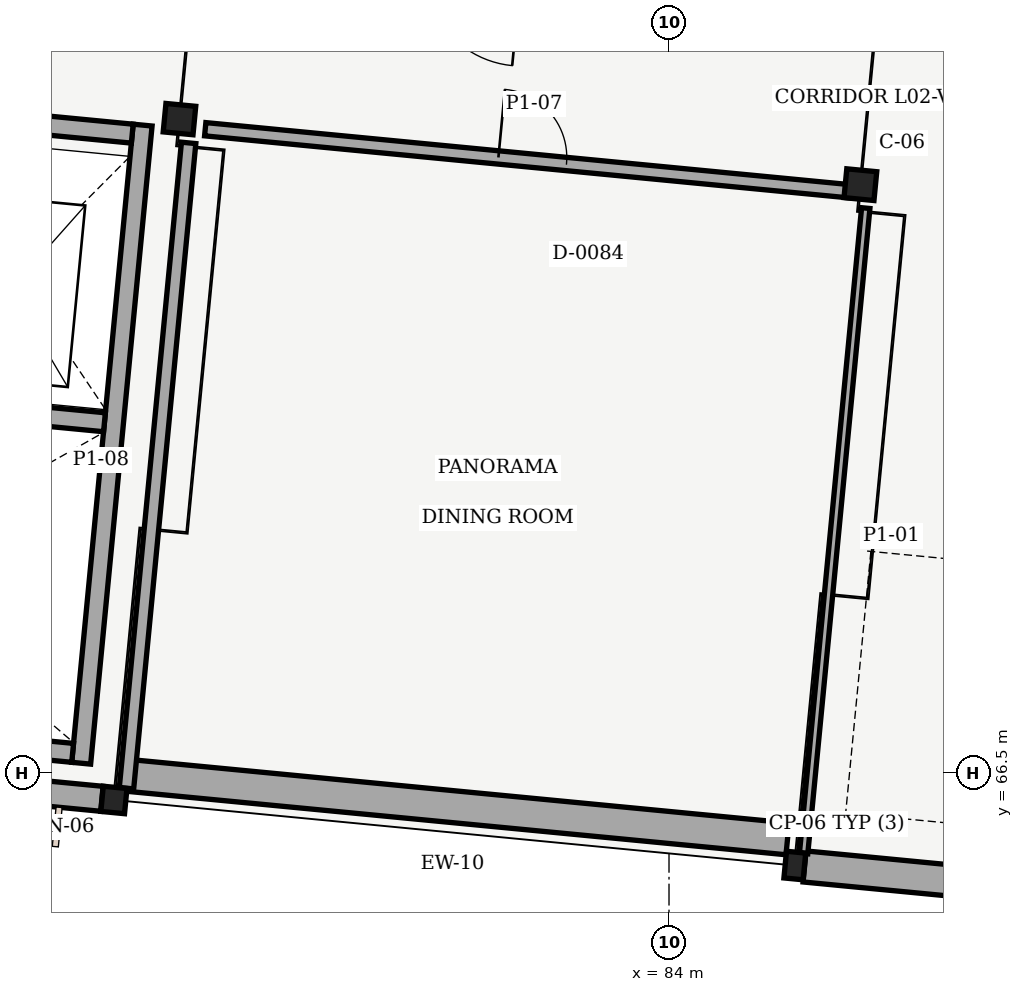
"""IFC4 building model, lengths in metres.
Left out: names, types, materials, properties, quantities, classifications, styles, units other than length and angle.
Written with IfcOpenShell. Run it as: python <this file> out.ifc"""

import sys

from ifc_helpers import new_model, si_unit, direction, frame, frame_2d, origin, origin_with_axes, origin_2d, place, context, subcontext, project, spatial, rectangle, i_section, extrude, element, fill, save


model = new_model("IFC4")
c1 = context("Model", 3, precision=1e-05, world=origin(), true_north=direction((0.0, 1.0)))
c2 = subcontext(c1, "Body", "Model", "MODEL_VIEW")
j1 = project(units=[si_unit("LENGTHUNIT", "METRE"), si_unit("PLANEANGLEUNIT", "RADIAN")], contexts=[c1])
p1 = place(None, origin())
s1 = spatial("IfcSite", under=j1, at=p1, CompositionType="ELEMENT")
p2 = place(p1, origin())
s2 = spatial("IfcBuilding", under=s1, at=p2, CompositionType="ELEMENT")
p3 = place(p2, frame((0.0, 0.0, 9.6)))
s3 = spatial("IfcBuildingStorey", under=s2, at=p3, CompositionType="ELEMENT", Elevation=9.6)
p4 = place(p3, frame((76.697, 66.141, 0.0), z_axis=(0.0, 0.0, 1.0), x_axis=(0.995396198367, -0.09584575252, 0.0)))
e1 = element("IfcColumn", 1, at=p4, inside=s3, PredefinedType="COLUMN", context=c2, shape_type="SweptSolid", body=[
    extrude(i_section(OverallWidth=0.313, OverallDepth=0.333, WebThickness=0.018, FlangeThickness=0.028, FilletRadius=0.013, at=origin_2d()), origin(), (0.0, 0.0, 1.0), 4.8),
])
p5 = place(p3, frame((77.559, 75.1, 0.0), z_axis=(0.0, 0.0, 1.0), x_axis=(0.995396198367, -0.09584575252, 0.0)))
e2 = element("IfcColumn", 2, at=p5, inside=s3, PredefinedType="COLUMN", context=c2, shape_type="SweptSolid", body=[
    extrude(i_section(OverallWidth=0.394, OverallDepth=0.376, WebThickness=0.017, FlangeThickness=0.028, FilletRadius=0.015, at=origin_2d()), origin(), (0.0, 0.0, 1.0), 4.8),
])
p6 = place(p3, frame((85.655, 65.279, 0.0), z_axis=(0.0, 0.0, 1.0), x_axis=(0.995396198367, -0.09584575252, 0.0)))
e3 = element("IfcColumn", 3, at=p6, inside=s3, PredefinedType="PILASTER", context=c2, shape_type="SweptSolid", body=[
    extrude(i_section(OverallWidth=0.254, OverallDepth=0.353, WebThickness=0.01, FlangeThickness=0.016, FilletRadius=0.012, at=origin_2d()), origin(), (0.0, 0.0, 1.0), 4.8),
])
p7 = place(p3, frame((86.518, 74.237, 0.0), z_axis=(0.0, 0.0, 1.0), x_axis=(0.995396198367, -0.09584575252, 0.0)))
e4 = element("IfcColumn", 4, at=p7, inside=s3, PredefinedType="COLUMN", context=c2, shape_type="SweptSolid", body=[
    extrude(i_section(OverallWidth=0.396, OverallDepth=0.381, WebThickness=0.019, FlangeThickness=0.03, FilletRadius=0.015, at=origin_2d()), origin(), (0.0, 0.0, 1.0), 4.8),
])
p8 = place(p3, frame((94.456, 64.431, 0.0), z_axis=(0.0, 0.0, 1.0), x_axis=(-0.99539453955, 0.09586297843, 0.0)))
e5 = element("IfcWall", 5, at=p8, inside=s3, PredefinedType="SOLIDWALL", context=c2, shape_type="SweptSolid", body=[
    extrude(rectangle(XDim=8.712, YDim=0.41, at=frame_2d((4.356, 0.0))), origin(), (0.0, 0.0, 1.0), 3.4),
])
p9 = place(p3, frame((85.559, 65.629, 0.0), z_axis=(0.0, 0.0, 1.0), x_axis=(-0.99539453955, 0.09586297843, 0.0)))
e6 = element("IfcWall", 6, at=p9, inside=s3, PredefinedType="SOLIDWALL", context=c2, shape_type="SweptSolid", body=[
    extrude(rectangle(XDim=8.712, YDim=0.42, at=frame_2d((4.356, 0.0))), origin(), (0.0, 0.0, 1.0), 3.4),
])
p10 = place(p3, frame((76.539, 66.156, 0.0), z_axis=(0.0, 0.0, 1.0), x_axis=(-0.995397794476, 0.095829174848, 0.0)))
e7 = element("IfcWall", 7, at=p10, inside=s3, PredefinedType="SOLIDWALL", context=c2, shape_type="SweptSolid", body=[
    extrude(rectangle(XDim=8.685, YDim=0.33, at=frame_2d((4.343, 0.0))), origin(), (0.0, 0.0, 1.0), 3.4),
])
p11 = place(p3, frame((76.266, 66.625, 0.0), z_axis=(0.0, 0.0, 1.0), x_axis=(0.095832083117, 0.995397514486, 0.0)))
e8 = element("IfcWall", 8, at=p11, inside=s3, PredefinedType="SHEAR", context=c2, shape_type="SweptSolid", body=[
    extrude(rectangle(XDim=8.435, YDim=0.25, at=frame_2d((4.218, 0.0))), origin(), (0.0, 0.0, 1.0), 4.54),
])
p12 = place(p3, frame((68.638, 67.485, 0.0), z_axis=(0.0, 0.0, 1.0), x_axis=(0.995396104215, -0.095846730326, 0.0)))
e9 = element("IfcWall", 9, at=p12, inside=s3, PredefinedType="SHEAR", context=c2, shape_type="SweptSolid", body=[
    extrude(rectangle(XDim=7.55, YDim=0.25, at=frame_2d((3.775, 0.0))), origin(), (0.0, 0.0, 1.0), 4.54),
])
p13 = place(p3, frame((76.573, 71.111, 0.0), z_axis=(0.0, 0.0, 1.0), x_axis=(-0.995396401267, 0.095843645303, 0.0)))
e10 = element("IfcWall", 10, at=p13, inside=s3, PredefinedType="SHEAR", context=c2, shape_type="SweptSolid", body=[
    extrude(rectangle(XDim=7.55, YDim=0.25, at=frame_2d((3.775, 0.0))), origin(), (0.0, 0.0, 1.0), 4.54),
])
p14 = place(p13, frame((6.0, 0.0, 0.0)))
e11 = element("IfcOpeningElement", 11, at=p14, cuts=e10, PredefinedType="OPENING", context=c2, shape_type="SweptSolid", body=[
    extrude(rectangle(XDim=1.1, YDim=2.15, at=frame_2d((0.55, 1.075))), frame((0.0, 0.135, 0.0), z_axis=(0.0, -1.0, 0.0), x_axis=(1.0, 0.0, 0.0)), (0.0, 0.0, 1.0), 0.27),
])
p15 = place(p3, frame((76.938, 74.908, 0.0), z_axis=(0.0, 0.0, 1.0), x_axis=(-0.995396104215, 0.095846730326, 0.0)))
e12 = element("IfcWall", 12, at=p15, inside=s3, PredefinedType="SHEAR", context=c2, shape_type="SweptSolid", body=[
    extrude(rectangle(XDim=7.55, YDim=0.25, at=frame_2d((3.775, 0.0))), origin(), (0.0, 0.0, 1.0), 4.54),
])
p16 = place(p15, frame((4.8, 0.0, 0.0)))
e13 = element("IfcOpeningElement", 13, at=p16, cuts=e12, PredefinedType="OPENING", context=c2, shape_type="SweptSolid", body=[
    extrude(rectangle(XDim=1.3, YDim=2.15, at=frame_2d((0.65, 1.075))), frame((0.0, 0.135, 0.0), z_axis=(0.0, -1.0, 0.0), x_axis=(1.0, 0.0, 0.0)), (0.0, 0.0, 1.0), 0.27),
])
p17 = place(p3, frame((93.716, 75.955, 0.0), z_axis=(0.0, 0.0, 1.0), x_axis=(-0.995396031197, 0.095847488636, 0.0)))
e14 = element("IfcWall", 14, at=p17, inside=s3, PredefinedType="PARTITIONING", context=c2, shape_type="SweptSolid", body=[
    extrude(rectangle(XDim=24.83, YDim=0.13, at=frame_2d((12.415, 0.0))), origin(), (0.0, 0.0, 1.0), 3.38),
])
p18 = place(p17, frame((11.71, 0.0, 0.0)))
e15 = element("IfcOpeningElement", 15, at=p18, cuts=e14, PredefinedType="OPENING", context=c2, shape_type="SweptSolid", body=[
    extrude(rectangle(XDim=1.28, YDim=2.2, at=frame_2d((0.64, 1.1))), frame((0.0, 0.075, 0.0), z_axis=(0.0, -1.0, 0.0), x_axis=(1.0, 0.0, 0.0)), (0.0, 0.0, 1.0), 0.15),
])
p19 = place(p3, frame((77.898, 74.967, 0.0), z_axis=(0.0, 0.0, 1.0), x_axis=(0.995394944933, -0.095858769045, 0.0)))
e16 = element("IfcWall", 16, at=p19, inside=s3, PredefinedType="PARTITIONING", context=c2, shape_type="SweptSolid", body=[
    extrude(rectangle(XDim=8.55, YDim=0.175, at=frame_2d((4.275, 0.0))), origin(), (0.0, 0.0, 1.0), 3.38),
])
p20 = place(p19, frame((3.875, 0.0, 0.0)))
e17 = element("IfcOpeningElement", 17, at=p20, cuts=e16, PredefinedType="OPENING", context=c2, shape_type="SweptSolid", body=[
    extrude(rectangle(XDim=0.9, YDim=2.1, at=frame_2d((0.45, 1.05))), frame((0.0, 0.098, 0.0), z_axis=(0.0, -1.0, 0.0), x_axis=(1.0, 0.0, 0.0)), (0.0, 0.0, 1.0), 0.195),
])
p21 = place(p3, frame((76.862, 66.296, 0.0), z_axis=(0.0, 0.0, 1.0), x_axis=(0.095853111028, 0.995395489796, 0.0)))
e18 = element("IfcWall", 18, at=p21, inside=s3, PredefinedType="PARTITIONING", context=c2, shape_type="SweptSolid", body=[
    extrude(rectangle(XDim=8.53, YDim=0.19, at=frame_2d((4.265, 0.0))), origin(), (0.0, 0.0, 1.0), 3.38),
])
p22 = place(p3, frame((86.589, 73.929, 0.0), z_axis=(0.0, 0.0, 1.0), x_axis=(-0.095853111028, -0.995395489796, 0.0)))
e19 = element("IfcWall", 19, at=p22, inside=s3, PredefinedType="PARTITIONING", context=c2, shape_type="SweptSolid", body=[
    extrude(rectangle(XDim=8.53, YDim=0.11, at=frame_2d((4.265, 0.0))), origin(), (0.0, 0.0, 1.0), 3.38),
])
p23 = place(p20, origin_with_axes())
e20 = element("IfcDoor", 20, at=p23, inside=s3, OperationType="SINGLE_SWING_LEFT", PredefinedType="DOOR", context=c2, shape_type="SweptSolid", body=[
    extrude(rectangle(XDim=0.9, YDim=2.1, at=frame_2d((0.45, 1.05))), frame((0.0, 0.025, 0.0), z_axis=(0.0, -1.0, 0.0), x_axis=(1.0, 0.0, 0.0)), (0.0, 0.0, 1.0), 0.05),
])
fill(e17, e20)
save(model, sys.argv[1])
